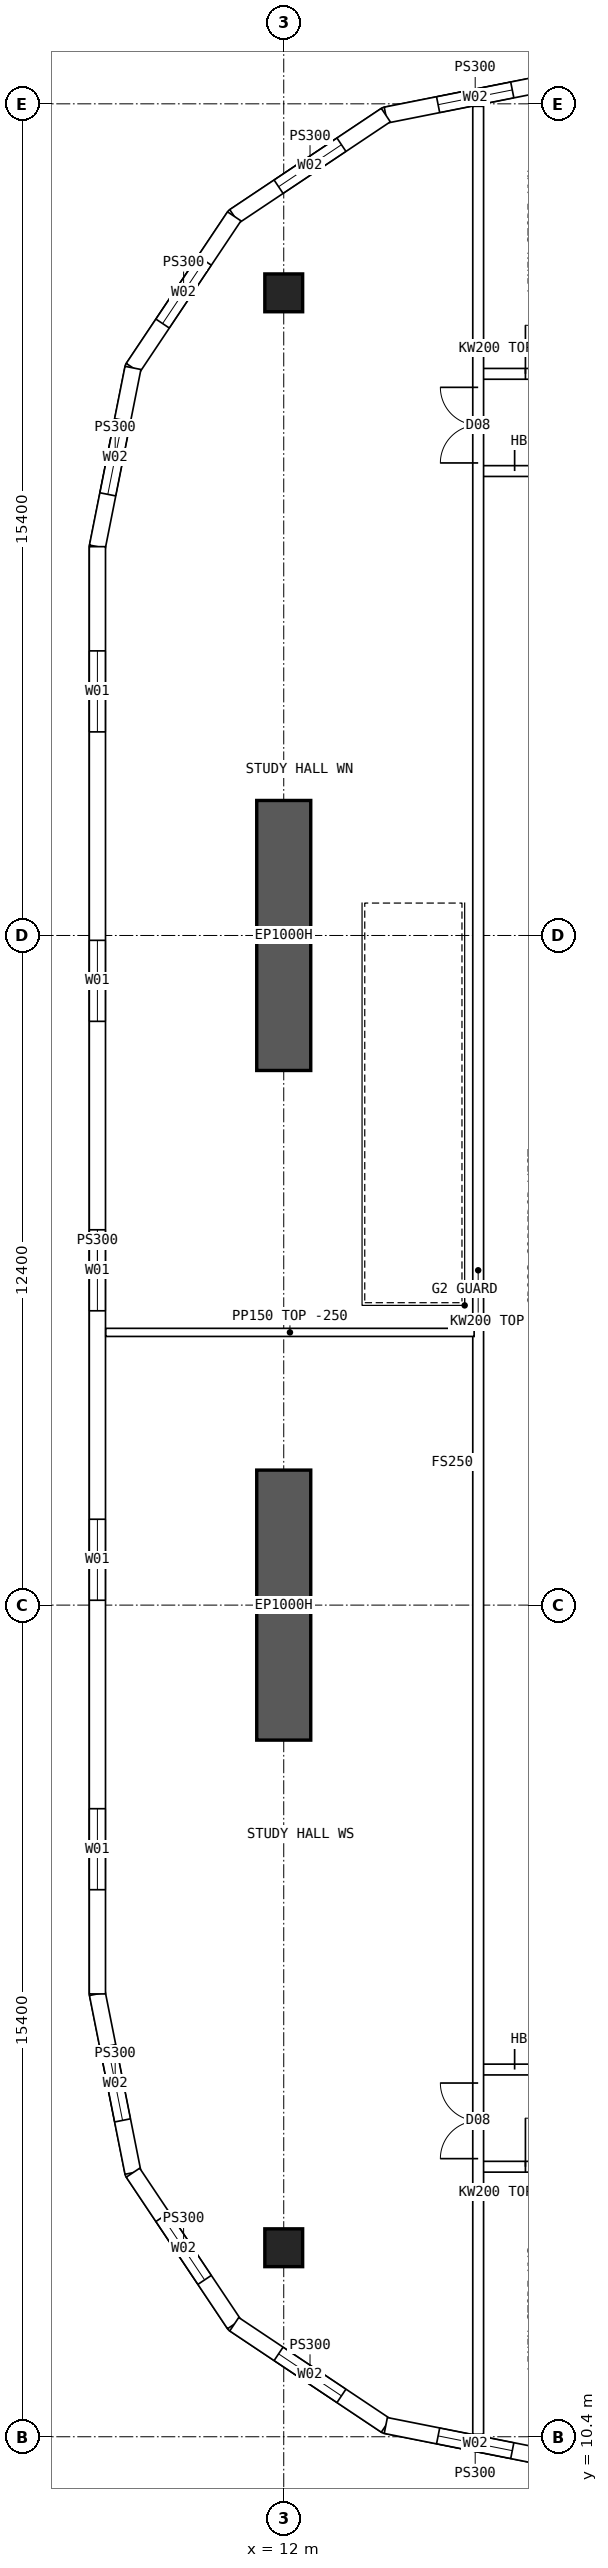
"""IFC4 building model, lengths in metres.
Left out: names, types, materials, properties, quantities, classifications, styles, units other than length and angle.
Written with IfcOpenShell. Run it as: python <this file> out.ifc"""

import sys

from ifc_helpers import new_model, si_unit, direction, frame, frame_2d, origin, origin_2d, place, context, subcontext, project, spatial, polyline, rectangle, hollow_rectangle, outline, extrude, element, fill, save


model = new_model("IFC4")
c1 = context("Model", 3, precision=1e-05, world=origin(), true_north=direction((0.0, 1.0)))
c2 = subcontext(c1, "Body", "Model", "MODEL_VIEW")
j1 = project(units=[si_unit("LENGTHUNIT", "METRE"), si_unit("PLANEANGLEUNIT", "RADIAN")], contexts=[c1])
p1 = place(None, origin())
s1 = spatial("IfcSite", under=j1, at=p1, CompositionType="ELEMENT")
p2 = place(p1, origin())
s2 = spatial("IfcBuilding", under=s1, at=p2, CompositionType="ELEMENT")
p3 = place(p2, frame((0.0, 0.0, 182.35)))
s3 = spatial("IfcBuildingStorey", under=s2, at=p3, CompositionType="ELEMENT", Elevation=182.35)
for number, where, z_axis, x_axis in (
    (1, (12.0, 13.9, 0.0), (0.0, 0.0, 1.0), (1.0, 0.0, 0.0)),
    (2, (12.0, 50.1, 0.0), (0.0, 0.0, 1.0), (1.0, 0.0, 0.0)),
):
    element("IfcColumn", number, at=place(p3, frame(where, z_axis=z_axis, x_axis=x_axis)), inside=s3, PredefinedType="COLUMN", context=c2, shape_type="SweptSolid", body=[
        extrude(hollow_rectangle(XDim=0.7, YDim=0.7, WallThickness=0.07, at=origin_2d()), origin(), (0.0, 0.0, 1.0), 3.75),
    ])
for number, where, z_axis, x_axis in (
    (3, (12.0, 23.3, 0.0), (0.0, 0.0, 1.0), (0.0, 1.0, 0.0)),
    (4, (12.0, 35.7, 0.0), (0.0, 0.0, 1.0), (0.0, 1.0, 0.0)),
):
    element("IfcWall", number, at=place(p3, frame(where, z_axis=z_axis, x_axis=x_axis)), inside=s3, PredefinedType="SHEAR", context=c2, shape_type="SweptSolid", body=[
        extrude(rectangle(XDim=5.0, YDim=1.0, at=frame_2d((2.5, 0.0))), origin(), (0.0, 0.0, 1.0), 3.75),
    ])
p4 = place(p3, frame((8.55, 45.4, 0.0), z_axis=(0.0, 0.0, 1.0), x_axis=(0.0, -1.0, 0.0)))
e5 = element("IfcWall", 5, at=p4, inside=s3, PredefinedType="SOLIDWALL", context=c2, shape_type="SweptSolid", body=[
    extrude(outline(polyline([(-0.015, -0.15), (26.815, -0.15), (26.785, 0.15), (0.015, 0.15), (-0.015, -0.15)])), origin(), (0.0, 0.0, 1.0), 3.5),
])
p5 = place(p4, frame((1.93, 0.0, 0.9)))
e6 = element("IfcOpeningElement", 6, at=p5, cuts=e5, PredefinedType="OPENING", context=c2, shape_type="SweptSolid", body=[
    extrude(rectangle(XDim=1.5, YDim=2.0, at=frame_2d((0.75, 1.0))), frame((0.0, 0.16, 0.0), z_axis=(0.0, -1.0, 0.0), x_axis=(1.0, 0.0, 0.0)), (0.0, 0.0, 1.0), 0.32),
])
p6 = place(p4, frame((7.29, 0.0, 0.9)))
e7 = element("IfcOpeningElement", 7, at=p6, cuts=e5, PredefinedType="OPENING", context=c2, shape_type="SweptSolid", body=[
    extrude(rectangle(XDim=1.5, YDim=2.0, at=frame_2d((0.75, 1.0))), frame((0.0, 0.16, 0.0), z_axis=(0.0, -1.0, 0.0), x_axis=(1.0, 0.0, 0.0)), (0.0, 0.0, 1.0), 0.32),
])
p7 = place(p4, frame((12.65, 0.0, 0.9)))
e8 = element("IfcOpeningElement", 8, at=p7, cuts=e5, PredefinedType="OPENING", context=c2, shape_type="SweptSolid", body=[
    extrude(rectangle(XDim=1.5, YDim=2.0, at=frame_2d((0.75, 1.0))), frame((0.0, 0.16, 0.0), z_axis=(0.0, -1.0, 0.0), x_axis=(1.0, 0.0, 0.0)), (0.0, 0.0, 1.0), 0.32),
])
p8 = place(p4, frame((18.01, 0.0, 0.9)))
e9 = element("IfcOpeningElement", 9, at=p8, cuts=e5, PredefinedType="OPENING", context=c2, shape_type="SweptSolid", body=[
    extrude(rectangle(XDim=1.5, YDim=2.0, at=frame_2d((0.75, 1.0))), frame((0.0, 0.16, 0.0), z_axis=(0.0, -1.0, 0.0), x_axis=(1.0, 0.0, 0.0)), (0.0, 0.0, 1.0), 0.32),
])
p9 = place(p4, frame((23.37, 0.0, 0.9)))
e10 = element("IfcOpeningElement", 10, at=p9, cuts=e5, PredefinedType="OPENING", context=c2, shape_type="SweptSolid", body=[
    extrude(rectangle(XDim=1.5, YDim=2.0, at=frame_2d((0.75, 1.0))), frame((0.0, 0.16, 0.0), z_axis=(0.0, -1.0, 0.0), x_axis=(1.0, 0.0, 0.0)), (0.0, 0.0, 1.0), 0.32),
])
p10 = place(p3, frame((17.2, 54.05, 0.0), z_axis=(0.0, 0.0, 1.0), x_axis=(-0.98078325777, -0.195100490205, 0.0)))
e11 = element("IfcWall", 11, at=p10, inside=s3, PredefinedType="SOLIDWALL", context=c2, shape_type="SweptSolid", body=[
    extrude(outline(polyline([(-0.03, -0.15), (3.405, -0.15), (3.345, 0.15), (0.03, 0.15), (-0.03, -0.15)])), origin(), (0.0, 0.0, 1.0), 3.5),
])
p11 = place(p10, frame((0.988, 0.0, 0.9)))
e12 = element("IfcOpeningElement", 12, at=p11, cuts=e11, PredefinedType="OPENING", context=c2, shape_type="SweptSolid", body=[
    extrude(rectangle(XDim=1.4, YDim=1.8, at=frame_2d((0.7, 0.9))), frame((0.0, 0.16, 0.0), z_axis=(0.0, -1.0, 0.0), x_axis=(1.0, 0.0, 0.0)), (0.0, 0.0, 1.0), 0.32),
])
p12 = place(p3, frame((13.89, 53.392, 0.0), z_axis=(0.0, 0.0, 1.0), x_axis=(-0.831493450887, -0.555534554399, 0.0)))
e13 = element("IfcWall", 13, at=p12, inside=s3, PredefinedType="SOLIDWALL", context=c2, shape_type="SweptSolid", body=[
    extrude(outline(polyline([(-0.03, -0.15), (3.405, -0.15), (3.345, 0.15), (0.03, 0.15), (-0.03, -0.15)])), origin(), (0.0, 0.0, 1.0), 3.5),
])
p13 = place(p12, frame((0.988, 0.0, 0.9)))
e14 = element("IfcOpeningElement", 14, at=p13, cuts=e13, PredefinedType="OPENING", context=c2, shape_type="SweptSolid", body=[
    extrude(rectangle(XDim=1.4, YDim=1.8, at=frame_2d((0.7, 0.9))), frame((0.0, 0.16, 0.0), z_axis=(0.0, -1.0, 0.0), x_axis=(1.0, 0.0, 0.0)), (0.0, 0.0, 1.0), 0.32),
])
p14 = place(p3, frame((11.083, 51.517, 0.0), z_axis=(0.0, 0.0, 1.0), x_axis=(-0.555534554399, -0.831493450887, 0.0)))
e15 = element("IfcWall", 15, at=p14, inside=s3, PredefinedType="SOLIDWALL", context=c2, shape_type="SweptSolid", body=[
    extrude(outline(polyline([(-0.03, -0.15), (3.405, -0.15), (3.345, 0.15), (0.03, 0.15), (-0.03, -0.15)])), origin(), (0.0, 0.0, 1.0), 3.5),
])
p15 = place(p14, frame((0.988, 0.0, 0.9)))
e16 = element("IfcOpeningElement", 16, at=p15, cuts=e15, PredefinedType="OPENING", context=c2, shape_type="SweptSolid", body=[
    extrude(rectangle(XDim=1.4, YDim=1.8, at=frame_2d((0.7, 0.9))), frame((0.0, 0.16, 0.0), z_axis=(0.0, -1.0, 0.0), x_axis=(1.0, 0.0, 0.0)), (0.0, 0.0, 1.0), 0.32),
])
p16 = place(p3, frame((9.208, 48.71, 0.0), z_axis=(0.0, 0.0, 1.0), x_axis=(-0.19508664885, -0.980786011034, 0.0)))
e17 = element("IfcWall", 17, at=p16, inside=s3, PredefinedType="SOLIDWALL", context=c2, shape_type="SweptSolid", body=[
    extrude(outline(polyline([(-0.03, -0.15), (3.39, -0.15), (3.36, 0.15), (0.03, 0.15), (-0.03, -0.15)])), origin(), (0.0, 0.0, 1.0), 3.5),
])
p17 = place(p16, frame((0.988, 0.0, 0.9)))
e18 = element("IfcOpeningElement", 18, at=p17, cuts=e17, PredefinedType="OPENING", context=c2, shape_type="SweptSolid", body=[
    extrude(rectangle(XDim=1.4, YDim=1.8, at=frame_2d((0.7, 0.9))), frame((0.0, 0.16, 0.0), z_axis=(0.0, -1.0, 0.0), x_axis=(1.0, 0.0, 0.0)), (0.0, 0.0, 1.0), 0.32),
])
p18 = place(p3, frame((8.55, 18.6, 0.0), z_axis=(0.0, 0.0, 1.0), x_axis=(0.19508664885, -0.980786011034, 0.0)))
e19 = element("IfcWall", 19, at=p18, inside=s3, PredefinedType="SOLIDWALL", context=c2, shape_type="SweptSolid", body=[
    extrude(outline(polyline([(-0.015, -0.15), (3.405, -0.15), (3.345, 0.15), (0.015, 0.15), (-0.015, -0.15)])), origin(), (0.0, 0.0, 1.0), 3.5),
])
p19 = place(p18, frame((0.988, 0.0, 0.9)))
e20 = element("IfcOpeningElement", 20, at=p19, cuts=e19, PredefinedType="OPENING", context=c2, shape_type="SweptSolid", body=[
    extrude(rectangle(XDim=1.4, YDim=1.8, at=frame_2d((0.7, 0.9))), frame((0.0, 0.16, 0.0), z_axis=(0.0, -1.0, 0.0), x_axis=(1.0, 0.0, 0.0)), (0.0, 0.0, 1.0), 0.32),
])
p20 = place(p3, frame((9.208, 15.29, 0.0), z_axis=(0.0, 0.0, 1.0), x_axis=(0.555534554399, -0.831493450887, 0.0)))
e21 = element("IfcWall", 21, at=p20, inside=s3, PredefinedType="SOLIDWALL", context=c2, shape_type="SweptSolid", body=[
    extrude(outline(polyline([(-0.03, -0.15), (3.405, -0.15), (3.345, 0.15), (0.03, 0.15), (-0.03, -0.15)])), origin(), (0.0, 0.0, 1.0), 3.5),
])
p21 = place(p20, frame((0.988, 0.0, 0.9)))
e22 = element("IfcOpeningElement", 22, at=p21, cuts=e21, PredefinedType="OPENING", context=c2, shape_type="SweptSolid", body=[
    extrude(rectangle(XDim=1.4, YDim=1.8, at=frame_2d((0.7, 0.9))), frame((0.0, 0.16, 0.0), z_axis=(0.0, -1.0, 0.0), x_axis=(1.0, 0.0, 0.0)), (0.0, 0.0, 1.0), 0.32),
])
p22 = place(p3, frame((11.083, 12.483, 0.0), z_axis=(0.0, 0.0, 1.0), x_axis=(0.831493450887, -0.555534554399, 0.0)))
e23 = element("IfcWall", 23, at=p22, inside=s3, PredefinedType="SOLIDWALL", context=c2, shape_type="SweptSolid", body=[
    extrude(outline(polyline([(-0.03, -0.15), (3.405, -0.15), (3.345, 0.15), (0.03, 0.15), (-0.03, -0.15)])), origin(), (0.0, 0.0, 1.0), 3.5),
])
p23 = place(p22, frame((0.988, 0.0, 0.9)))
e24 = element("IfcOpeningElement", 24, at=p23, cuts=e23, PredefinedType="OPENING", context=c2, shape_type="SweptSolid", body=[
    extrude(rectangle(XDim=1.4, YDim=1.8, at=frame_2d((0.7, 0.9))), frame((0.0, 0.16, 0.0), z_axis=(0.0, -1.0, 0.0), x_axis=(1.0, 0.0, 0.0)), (0.0, 0.0, 1.0), 0.32),
])
p24 = place(p3, frame((13.89, 10.608, 0.0), z_axis=(0.0, 0.0, 1.0), x_axis=(0.98078325777, -0.195100490205, 0.0)))
e25 = element("IfcWall", 25, at=p24, inside=s3, PredefinedType="SOLIDWALL", context=c2, shape_type="SweptSolid", body=[
    extrude(outline(polyline([(-0.03, -0.15), (3.405, -0.15), (3.345, 0.15), (0.03, 0.15), (-0.03, -0.15)])), origin(), (0.0, 0.0, 1.0), 3.5),
])
p25 = place(p24, frame((0.988, 0.0, 0.9)))
e26 = element("IfcOpeningElement", 26, at=p25, cuts=e25, PredefinedType="OPENING", context=c2, shape_type="SweptSolid", body=[
    extrude(rectangle(XDim=1.4, YDim=1.8, at=frame_2d((0.7, 0.9))), frame((0.0, 0.16, 0.0), z_axis=(0.0, -1.0, 0.0), x_axis=(1.0, 0.0, 0.0)), (0.0, 0.0, 1.0), 0.32),
])
p26 = place(p3, frame((15.6, 15.4, 0.0), z_axis=(0.0, 0.0, 1.0), x_axis=(1.0, 0.0, 0.0)))
e27 = element("IfcWall", 27, at=p26, inside=s3, PredefinedType="SOLIDWALL", context=c2, shape_type="SweptSolid", body=[
    extrude(rectangle(XDim=1.975, YDim=0.2, at=frame_2d((0.987, 0.0))), origin(), (0.0, 0.0, 1.0), 3.5),
])
p27 = place(p26, frame((0.875, 0.0, 0.0)))
e28 = element("IfcOpeningElement", 28, at=p27, cuts=e27, PredefinedType="OPENING", context=c2, shape_type="SweptSolid", body=[
    extrude(rectangle(XDim=0.9, YDim=2.1, at=frame_2d((0.45, 1.05))), frame((0.0, 0.11, 0.0), z_axis=(0.0, -1.0, 0.0), x_axis=(1.0, 0.0, 0.0)), (0.0, 0.0, 1.0), 0.22),
])
p28 = place(p3, frame((15.6, 17.2, 0.0), z_axis=(0.0, 0.0, 1.0), x_axis=(1.0, 0.0, 0.0)))
e29 = element("IfcWall", 29, at=p28, inside=s3, PredefinedType="SOLIDWALL", context=c2, shape_type="SweptSolid", body=[
    extrude(rectangle(XDim=1.975, YDim=0.2, at=frame_2d((0.987, 0.0))), origin(), (0.0, 0.0, 1.0), 3.5),
])
p29 = place(p28, frame((0.675, 0.0, 0.0)))
e30 = element("IfcOpeningElement", 30, at=p29, cuts=e29, PredefinedType="OPENING", context=c2, shape_type="SweptSolid", body=[
    extrude(rectangle(XDim=1.2, YDim=2.1, at=frame_2d((0.6, 1.05))), frame((0.0, 0.11, 0.0), z_axis=(0.0, -1.0, 0.0), x_axis=(1.0, 0.0, 0.0)), (0.0, 0.0, 1.0), 0.22),
])
p30 = place(p3, frame((15.6, 48.6, 0.0), z_axis=(0.0, 0.0, 1.0), x_axis=(1.0, 0.0, 0.0)))
e31 = element("IfcWall", 31, at=p30, inside=s3, PredefinedType="SOLIDWALL", context=c2, shape_type="SweptSolid", body=[
    extrude(rectangle(XDim=1.975, YDim=0.2, at=frame_2d((0.987, 0.0))), origin(), (0.0, 0.0, 1.0), 3.5),
])
p31 = place(p30, frame((0.875, 0.0, 0.0)))
e32 = element("IfcOpeningElement", 32, at=p31, cuts=e31, PredefinedType="OPENING", context=c2, shape_type="SweptSolid", body=[
    extrude(rectangle(XDim=0.9, YDim=2.1, at=frame_2d((0.45, 1.05))), frame((0.0, 0.11, 0.0), z_axis=(0.0, -1.0, 0.0), x_axis=(1.0, 0.0, 0.0)), (0.0, 0.0, 1.0), 0.22),
])
p32 = place(p3, frame((15.6, 46.8, 0.0), z_axis=(0.0, 0.0, 1.0), x_axis=(1.0, 0.0, 0.0)))
e33 = element("IfcWall", 33, at=p32, inside=s3, PredefinedType="SOLIDWALL", context=c2, shape_type="SweptSolid", body=[
    extrude(rectangle(XDim=1.975, YDim=0.2, at=frame_2d((0.987, 0.0))), origin(), (0.0, 0.0, 1.0), 3.5),
])
p33 = place(p32, frame((0.675, 0.0, 0.0)))
e34 = element("IfcOpeningElement", 34, at=p33, cuts=e33, PredefinedType="OPENING", context=c2, shape_type="SweptSolid", body=[
    extrude(rectangle(XDim=1.2, YDim=2.1, at=frame_2d((0.6, 1.05))), frame((0.0, 0.11, 0.0), z_axis=(0.0, -1.0, 0.0), x_axis=(1.0, 0.0, 0.0)), (0.0, 0.0, 1.0), 0.22),
])
p34 = place(p3, frame((8.705, 30.85, 0.0), z_axis=(0.0, 0.0, 1.0), x_axis=(1.0, 0.0, 0.0)))
e35 = element("IfcWall", 35, at=p34, inside=s3, PredefinedType="PARTITIONING", context=c2, shape_type="SweptSolid", body=[
    extrude(outline(polyline([(0.0, 0.0), (6.82, 0.0), (6.82, 3.5), (3.597, 3.5), (3.595, 3.05), (2.997, 3.05), (2.995, 3.5), (0.0, 3.5), (0.0, 0.0)])), frame((0.0, 0.075, 0.0), z_axis=(0.0, -1.0, 0.0), x_axis=(1.0, 0.0, 0.0)), (0.0, 0.0, 1.0), 0.15),
])
p35 = place(p3, frame((15.6, 10.446, 0.0), z_axis=(0.0, 0.0, 1.0), x_axis=(0.0, 1.0, 0.0)))
e36 = element("IfcWall", 36, at=p35, inside=s3, PredefinedType="SOLIDWALL", context=c2, shape_type="SweptSolid", body=[
    extrude(rectangle(XDim=43.107, YDim=0.2, at=frame_2d((21.554, 0.0))), origin(), (0.0, 0.0, 1.0), 3.5),
])
p36 = place(p35, frame((5.104, 0.0, 0.0)))
e37 = element("IfcOpeningElement", 37, at=p36, cuts=e36, PredefinedType="OPENING", context=c2, shape_type="SweptSolid", body=[
    extrude(rectangle(XDim=1.4, YDim=2.1, at=frame_2d((0.7, 1.05))), frame((0.0, 0.11, 0.0), z_axis=(0.0, -1.0, 0.0), x_axis=(1.0, 0.0, 0.0)), (0.0, 0.0, 1.0), 0.22),
])
p37 = place(p35, frame((36.504, 0.0, 0.0)))
e38 = element("IfcOpeningElement", 38, at=p37, cuts=e36, PredefinedType="OPENING", context=c2, shape_type="SweptSolid", body=[
    extrude(rectangle(XDim=1.4, YDim=2.1, at=frame_2d((0.7, 1.05))), frame((0.0, 0.11, 0.0), z_axis=(0.0, -1.0, 0.0), x_axis=(1.0, 0.0, 0.0)), (0.0, 0.0, 1.0), 0.22),
])
p38 = place(p5, origin())
e39 = element("IfcWindow", 39, at=p38, inside=s3, PartitioningType="SINGLE_PANEL", PredefinedType="WINDOW", context=c2, shape_type="SweptSolid", body=[
    extrude(rectangle(XDim=1.5, YDim=2.0, at=frame_2d((0.75, 1.0))), frame((0.0, 0.03, 0.0), z_axis=(0.0, -1.0, 0.0), x_axis=(1.0, 0.0, 0.0)), (0.0, 0.0, 1.0), 0.06),
])
fill(e6, e39)
p39 = place(p6, origin())
e40 = element("IfcWindow", 40, at=p39, inside=s3, PartitioningType="SINGLE_PANEL", PredefinedType="WINDOW", context=c2, shape_type="SweptSolid", body=[
    extrude(rectangle(XDim=1.5, YDim=2.0, at=frame_2d((0.75, 1.0))), frame((0.0, 0.03, 0.0), z_axis=(0.0, -1.0, 0.0), x_axis=(1.0, 0.0, 0.0)), (0.0, 0.0, 1.0), 0.06),
])
fill(e7, e40)
p40 = place(p7, origin())
e41 = element("IfcWindow", 41, at=p40, inside=s3, PartitioningType="SINGLE_PANEL", PredefinedType="WINDOW", context=c2, shape_type="SweptSolid", body=[
    extrude(rectangle(XDim=1.5, YDim=2.0, at=frame_2d((0.75, 1.0))), frame((0.0, 0.03, 0.0), z_axis=(0.0, -1.0, 0.0), x_axis=(1.0, 0.0, 0.0)), (0.0, 0.0, 1.0), 0.06),
])
fill(e8, e41)
p41 = place(p8, origin())
e42 = element("IfcWindow", 42, at=p41, inside=s3, PartitioningType="SINGLE_PANEL", PredefinedType="WINDOW", context=c2, shape_type="SweptSolid", body=[
    extrude(rectangle(XDim=1.5, YDim=2.0, at=frame_2d((0.75, 1.0))), frame((0.0, 0.03, 0.0), z_axis=(0.0, -1.0, 0.0), x_axis=(1.0, 0.0, 0.0)), (0.0, 0.0, 1.0), 0.06),
])
fill(e9, e42)
p42 = place(p9, origin())
e43 = element("IfcWindow", 43, at=p42, inside=s3, PartitioningType="SINGLE_PANEL", PredefinedType="WINDOW", context=c2, shape_type="SweptSolid", body=[
    extrude(rectangle(XDim=1.5, YDim=2.0, at=frame_2d((0.75, 1.0))), frame((0.0, 0.03, 0.0), z_axis=(0.0, -1.0, 0.0), x_axis=(1.0, 0.0, 0.0)), (0.0, 0.0, 1.0), 0.06),
])
fill(e10, e43)
p43 = place(p11, origin())
e44 = element("IfcWindow", 44, at=p43, inside=s3, PartitioningType="SINGLE_PANEL", PredefinedType="WINDOW", context=c2, shape_type="SweptSolid", body=[
    extrude(rectangle(XDim=1.4, YDim=1.8, at=frame_2d((0.7, 0.9))), frame((0.0, 0.03, 0.0), z_axis=(0.0, -1.0, 0.0), x_axis=(1.0, 0.0, 0.0)), (0.0, 0.0, 1.0), 0.06),
])
fill(e12, e44)
p44 = place(p13, origin())
e45 = element("IfcWindow", 45, at=p44, inside=s3, PartitioningType="SINGLE_PANEL", PredefinedType="WINDOW", context=c2, shape_type="SweptSolid", body=[
    extrude(rectangle(XDim=1.4, YDim=1.8, at=frame_2d((0.7, 0.9))), frame((0.0, 0.03, 0.0), z_axis=(0.0, -1.0, 0.0), x_axis=(1.0, 0.0, 0.0)), (0.0, 0.0, 1.0), 0.06),
])
fill(e14, e45)
p45 = place(p15, origin())
e46 = element("IfcWindow", 46, at=p45, inside=s3, PartitioningType="SINGLE_PANEL", PredefinedType="WINDOW", context=c2, shape_type="SweptSolid", body=[
    extrude(rectangle(XDim=1.4, YDim=1.8, at=frame_2d((0.7, 0.9))), frame((0.0, 0.03, 0.0), z_axis=(0.0, -1.0, 0.0), x_axis=(1.0, 0.0, 0.0)), (0.0, 0.0, 1.0), 0.06),
])
fill(e16, e46)
p46 = place(p17, origin())
e47 = element("IfcWindow", 47, at=p46, inside=s3, PartitioningType="SINGLE_PANEL", PredefinedType="WINDOW", context=c2, shape_type="SweptSolid", body=[
    extrude(rectangle(XDim=1.4, YDim=1.8, at=frame_2d((0.7, 0.9))), frame((0.0, 0.03, 0.0), z_axis=(0.0, -1.0, 0.0), x_axis=(1.0, 0.0, 0.0)), (0.0, 0.0, 1.0), 0.06),
])
fill(e18, e47)
p47 = place(p19, origin())
e48 = element("IfcWindow", 48, at=p47, inside=s3, PartitioningType="SINGLE_PANEL", PredefinedType="WINDOW", context=c2, shape_type="SweptSolid", body=[
    extrude(rectangle(XDim=1.4, YDim=1.8, at=frame_2d((0.7, 0.9))), frame((0.0, 0.03, 0.0), z_axis=(0.0, -1.0, 0.0), x_axis=(1.0, 0.0, 0.0)), (0.0, 0.0, 1.0), 0.06),
])
fill(e20, e48)
p48 = place(p21, origin())
e49 = element("IfcWindow", 49, at=p48, inside=s3, PartitioningType="SINGLE_PANEL", PredefinedType="WINDOW", context=c2, shape_type="SweptSolid", body=[
    extrude(rectangle(XDim=1.4, YDim=1.8, at=frame_2d((0.7, 0.9))), frame((0.0, 0.03, 0.0), z_axis=(0.0, -1.0, 0.0), x_axis=(1.0, 0.0, 0.0)), (0.0, 0.0, 1.0), 0.06),
])
fill(e22, e49)
p49 = place(p23, origin())
e50 = element("IfcWindow", 50, at=p49, inside=s3, PartitioningType="SINGLE_PANEL", PredefinedType="WINDOW", context=c2, shape_type="SweptSolid", body=[
    extrude(rectangle(XDim=1.4, YDim=1.8, at=frame_2d((0.7, 0.9))), frame((0.0, 0.03, 0.0), z_axis=(0.0, -1.0, 0.0), x_axis=(1.0, 0.0, 0.0)), (0.0, 0.0, 1.0), 0.06),
])
fill(e24, e50)
p50 = place(p25, origin())
e51 = element("IfcWindow", 51, at=p50, inside=s3, PartitioningType="SINGLE_PANEL", PredefinedType="WINDOW", context=c2, shape_type="SweptSolid", body=[
    extrude(rectangle(XDim=1.4, YDim=1.8, at=frame_2d((0.7, 0.9))), frame((0.0, 0.03, 0.0), z_axis=(0.0, -1.0, 0.0), x_axis=(1.0, 0.0, 0.0)), (0.0, 0.0, 1.0), 0.06),
])
fill(e26, e51)
p51 = place(p29, origin())
e52 = element("IfcDoor", 52, at=p51, inside=s3, OperationType="DOUBLE_DOOR_SINGLE_SWING", PredefinedType="DOOR", context=c2, shape_type="SweptSolid", body=[
    extrude(rectangle(XDim=1.2, YDim=2.1, at=frame_2d((0.6, 1.05))), frame((0.0, 0.025, 0.0), z_axis=(0.0, -1.0, 0.0), x_axis=(1.0, 0.0, 0.0)), (0.0, 0.0, 1.0), 0.05),
])
fill(e30, e52)
p52 = place(p33, origin())
e53 = element("IfcDoor", 53, at=p52, inside=s3, OperationType="DOUBLE_DOOR_SINGLE_SWING", PredefinedType="DOOR", context=c2, shape_type="SweptSolid", body=[
    extrude(rectangle(XDim=1.2, YDim=2.1, at=frame_2d((0.6, 1.05))), frame((0.0, 0.025, 0.0), z_axis=(0.0, -1.0, 0.0), x_axis=(1.0, 0.0, 0.0)), (0.0, 0.0, 1.0), 0.05),
])
fill(e34, e53)
p53 = place(p36, origin())
e54 = element("IfcDoor", 54, at=p53, inside=s3, OperationType="DOUBLE_DOOR_SINGLE_SWING", PredefinedType="DOOR", context=c2, shape_type="SweptSolid", body=[
    extrude(rectangle(XDim=1.4, YDim=2.1, at=frame_2d((0.7, 1.05))), frame((0.0, 0.025, 0.0), z_axis=(0.0, -1.0, 0.0), x_axis=(1.0, 0.0, 0.0)), (0.0, 0.0, 1.0), 0.05),
])
fill(e37, e54)
p54 = place(p37, origin())
e55 = element("IfcDoor", 55, at=p54, inside=s3, OperationType="DOUBLE_DOOR_SINGLE_SWING", PredefinedType="DOOR", context=c2, shape_type="SweptSolid", body=[
    extrude(rectangle(XDim=1.4, YDim=2.1, at=frame_2d((0.7, 1.05))), frame((0.0, 0.025, 0.0), z_axis=(0.0, -1.0, 0.0), x_axis=(1.0, 0.0, 0.0)), (0.0, 0.0, 1.0), 0.05),
])
fill(e38, e55)
p55 = place(p27, origin())
e56 = element("IfcDoor", 56, at=p55, inside=s3, OperationType="SINGLE_SWING_LEFT", PredefinedType="DOOR", context=c2, shape_type="SweptSolid", body=[
    extrude(rectangle(XDim=0.9, YDim=2.1, at=frame_2d((0.45, 1.05))), frame((0.0, 0.025, 0.0), z_axis=(0.0, -1.0, 0.0), x_axis=(1.0, 0.0, 0.0)), (0.0, 0.0, 1.0), 0.05),
])
fill(e28, e56)
p56 = place(p31, origin())
e57 = element("IfcDoor", 57, at=p56, inside=s3, OperationType="SINGLE_SWING_LEFT", PredefinedType="DOOR", context=c2, shape_type="SweptSolid", body=[
    extrude(rectangle(XDim=0.9, YDim=2.1, at=frame_2d((0.45, 1.05))), frame((0.0, 0.025, 0.0), z_axis=(0.0, -1.0, 0.0), x_axis=(1.0, 0.0, 0.0)), (0.0, 0.0, 1.0), 0.05),
])
fill(e32, e57)
save(model, sys.argv[1])
